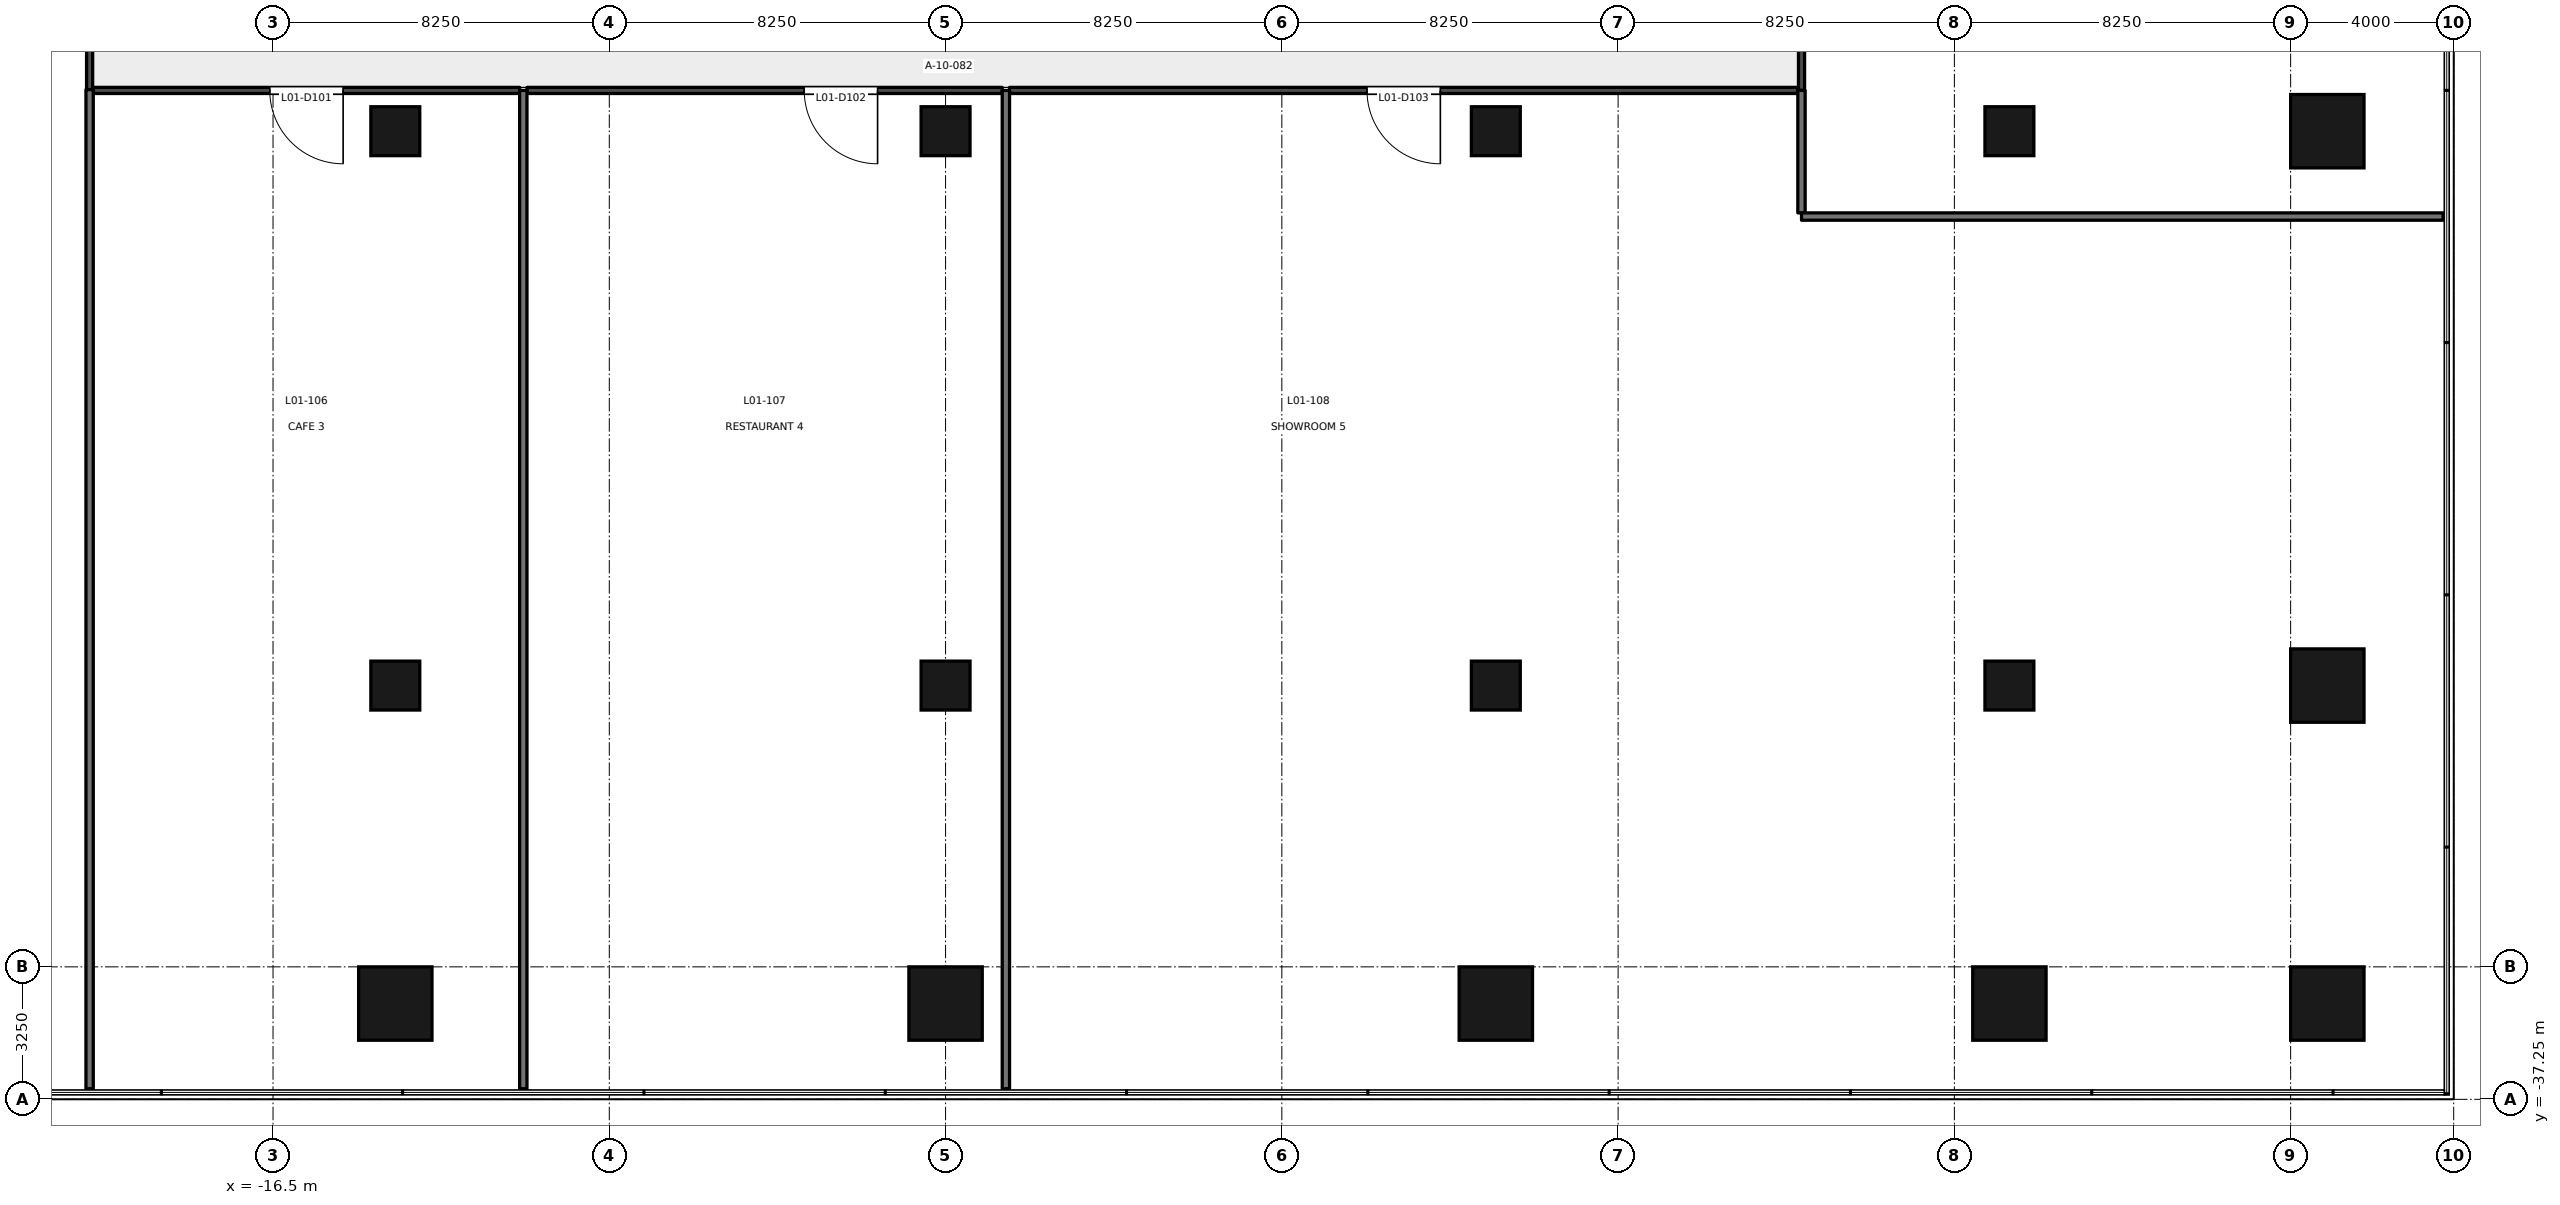
"""IFC4 building model, lengths in metres.
Left out: names, types, materials, properties, quantities, classifications, styles, units other than length and angle.
Written with IfcOpenShell. Run it as: python <this file> out.ifc"""

import sys

from ifc_helpers import new_model, si_unit, direction, frame, frame_2d, origin, origin_2d, place, context, subcontext, project, spatial, rectangle, extrude, element, fill, save


model = new_model("IFC4")
c1 = context("Model", 3, precision=1e-05, world=origin(), true_north=direction((0.0, 1.0)))
c2 = subcontext(c1, "Body", "Model", "MODEL_VIEW")
j1 = project(units=[si_unit("LENGTHUNIT", "METRE"), si_unit("PLANEANGLEUNIT", "RADIAN")], contexts=[c1])
p1 = place(None, origin())
s1 = spatial("IfcSite", under=j1, at=p1, CompositionType="ELEMENT")
p2 = place(p1, origin())
s2 = spatial("IfcBuilding", under=s1, at=p2, CompositionType="ELEMENT")
p3 = place(p2, frame((0.0, 0.0, 7.2)))
s3 = spatial("IfcBuildingStorey", under=s2, at=p3, CompositionType="ELEMENT", Elevation=7.2)
for number, where, z_axis, x_axis in (
    (1, (33.9, -34.9, -0.2), (0.0, 0.0, 1.0), (1.0, 0.0, 0.0)),
    (2, (-13.5, -34.9, -0.2), (0.0, 0.0, 1.0), (1.0, 0.0, 0.0)),
    (3, (0.0, -34.9, -0.2), (0.0, 0.0, 1.0), (1.0, 0.0, 0.0)),
    (4, (13.5, -34.9, -0.2), (0.0, 0.0, 1.0), (1.0, 0.0, 0.0)),
    (5, (26.1, -34.9, -0.2), (0.0, 0.0, 1.0), (1.0, 0.0, 0.0)),
    (6, (33.9, -27.1, -0.2), (0.0, 0.0, 1.0), (0.0, 1.0, 0.0)),
    (7, (33.9, -13.5, -0.2), (0.0, 0.0, 1.0), (0.0, 1.0, 0.0)),
):
    element("IfcColumn", number, at=place(p3, frame(where, z_axis=z_axis, x_axis=x_axis)), inside=s3, PredefinedType="COLUMN", context=c2, shape_type="SweptSolid", body=[
        extrude(rectangle(XDim=1.8, YDim=1.8, at=origin_2d()), origin(), (0.0, 0.0, 1.0), 5.4),
    ])
for number, where, z_axis, x_axis in (
    (8, (-13.5, -27.1, -0.2), (0.0, 0.0, 1.0), (1.0, 0.0, 0.0)),
    (9, (0.0, -27.1, -0.2), (0.0, 0.0, 1.0), (1.0, 0.0, 0.0)),
    (10, (13.5, -27.1, -0.2), (0.0, 0.0, 1.0), (1.0, 0.0, 0.0)),
    (11, (26.1, -27.1, -0.2), (0.0, 0.0, 1.0), (1.0, 0.0, 0.0)),
    (12, (-13.5, -13.5, -0.2), (0.0, 0.0, 1.0), (1.0, 0.0, 0.0)),
    (13, (0.0, -13.5, -0.2), (0.0, 0.0, 1.0), (1.0, 0.0, 0.0)),
    (14, (13.5, -13.5, -0.2), (0.0, 0.0, 1.0), (1.0, 0.0, 0.0)),
    (15, (26.1, -13.5, -0.2), (0.0, 0.0, 1.0), (1.0, 0.0, 0.0)),
):
    element("IfcColumn", number, at=place(p3, frame(where, z_axis=z_axis, x_axis=x_axis)), inside=s3, PredefinedType="COLUMN", context=c2, shape_type="SweptSolid", body=[
        extrude(rectangle(XDim=1.2, YDim=1.2, at=origin_2d()), origin(), (0.0, 0.0, 1.0), 5.4),
    ])
p4 = place(p3, frame((-21.0, -12.48, 0.0), z_axis=(0.0, 0.0, 1.0), x_axis=(0.0, 1.0, 0.0)))
e16 = element("IfcWall", 16, at=p4, inside=s3, PredefinedType="PARTITIONING", context=c2, shape_type="SweptSolid", body=[
    extrude(rectangle(XDim=5.08, YDim=0.15, at=frame_2d((2.54, 0.0))), origin(), (0.0, 0.0, 1.0), 5.2),
])
p5 = place(p4, frame((2.196, 0.0, 0.0)))
e17 = element("IfcOpeningElement", 17, at=p5, cuts=e16, PredefinedType="OPENING", context=c2, shape_type="SweptSolid", body=[
    extrude(rectangle(XDim=1.8, YDim=2.1, at=frame_2d((0.9, 1.05))), frame((0.0, 0.085, 0.0), z_axis=(0.0, -1.0, 0.0), x_axis=(1.0, 0.0, 0.0)), (0.0, 0.0, 1.0), 0.171),
])
p6 = place(p3, frame((-10.45, -12.5, 0.0), z_axis=(0.0, 0.0, 1.0), x_axis=(-1.0, 0.0, 0.0)))
e18 = element("IfcWall", 18, at=p6, inside=s3, PredefinedType="PARTITIONING", context=c2, shape_type="SweptSolid", body=[
    extrude(rectangle(XDim=10.46, YDim=0.15, at=frame_2d((5.23, 0.0))), origin(), (0.0, 0.0, 1.0), 3.8),
])
p7 = place(p6, frame((4.33, 0.0, 0.0)))
e19 = element("IfcOpeningElement", 19, at=p7, cuts=e18, PredefinedType="OPENING", context=c2, shape_type="SweptSolid", body=[
    extrude(rectangle(XDim=1.8, YDim=2.1, at=frame_2d((0.9, 1.05))), frame((0.0, 0.085, 0.0), z_axis=(0.0, -1.0, 0.0), x_axis=(1.0, 0.0, 0.0)), (0.0, 0.0, 1.0), 0.171),
])
p8 = place(p3, frame((1.39, -12.5, 0.0), z_axis=(0.0, 0.0, 1.0), x_axis=(-1.0, 0.0, 0.0)))
e20 = element("IfcWall", 20, at=p8, inside=s3, PredefinedType="PARTITIONING", context=c2, shape_type="SweptSolid", body=[
    extrude(rectangle(XDim=11.66, YDim=0.15, at=frame_2d((5.83, 0.0))), origin(), (0.0, 0.0, 1.0), 3.8),
])
p9 = place(p8, frame((3.058, 0.0, 0.0)))
e21 = element("IfcOpeningElement", 21, at=p9, cuts=e20, PredefinedType="OPENING", context=c2, shape_type="SweptSolid", body=[
    extrude(rectangle(XDim=1.8, YDim=2.1, at=frame_2d((0.9, 1.05))), frame((0.0, 0.085, 0.0), z_axis=(0.0, -1.0, 0.0), x_axis=(1.0, 0.0, 0.0)), (0.0, 0.0, 1.0), 0.171),
])
p10 = place(p3, frame((20.909, -12.5, 0.0), z_axis=(0.0, 0.0, 1.0), x_axis=(-1.0, 0.0, 0.0)))
e22 = element("IfcWall", 22, at=p10, inside=s3, PredefinedType="PARTITIONING", context=c2, shape_type="SweptSolid", body=[
    extrude(rectangle(XDim=19.339, YDim=0.15, at=frame_2d((9.669, 0.0))), origin(), (0.0, 0.0, 1.0), 3.8),
])
p11 = place(p10, frame((8.77, 0.0, 0.0)))
e23 = element("IfcOpeningElement", 23, at=p11, cuts=e22, PredefinedType="OPENING", context=c2, shape_type="SweptSolid", body=[
    extrude(rectangle(XDim=1.8, YDim=2.1, at=frame_2d((0.9, 1.05))), frame((0.0, 0.085, 0.0), z_axis=(0.0, -1.0, 0.0), x_axis=(1.0, 0.0, 0.0)), (0.0, 0.0, 1.0), 0.171),
])
p12 = place(p3, frame((21.0, -7.4, 0.0), z_axis=(0.0, 0.0, 1.0), x_axis=(0.0, -1.0, 0.0)))
e24 = element("IfcWall", 24, at=p12, inside=s3, PredefinedType="PARTITIONING", context=c2, shape_type="SweptSolid", body=[
    extrude(rectangle(XDim=5.1, YDim=0.15, at=frame_2d((2.55, 0.0))), origin(), (0.0, 0.0, 1.0), 5.2),
])
p13 = place(p12, frame((1.09, 0.0, 0.0)))
e25 = element("IfcOpeningElement", 25, at=p13, cuts=e24, PredefinedType="OPENING", context=c2, shape_type="SweptSolid", body=[
    extrude(rectangle(XDim=1.8, YDim=2.1, at=frame_2d((0.9, 1.05))), frame((0.0, 0.085, 0.0), z_axis=(0.0, -1.0, 0.0), x_axis=(1.0, 0.0, 0.0)), (0.0, 0.0, 1.0), 0.171),
])
p14 = place(p3, frame((-21.0, -12.48, 0.0), z_axis=(0.0, 0.0, 1.0), x_axis=(0.0, -1.0, 0.0)))
e26 = element("IfcWall", 26, at=p14, inside=s3, PredefinedType="PARTITIONING", context=c2, shape_type="SweptSolid", body=[
    extrude(rectangle(XDim=24.51, YDim=0.18, at=frame_2d((12.255, 0.0))), origin(), (0.0, 0.0, 1.0), 4.2),
])
for number, where, z_axis, x_axis in (
    (27, (-10.36, -12.5, 0.0), (0.0, 0.0, 1.0), (0.0, -1.0, 0.0)),
    (28, (1.48, -12.5, 0.0), (0.0, 0.0, 1.0), (0.0, -1.0, 0.0)),
):
    element("IfcWall", number, at=place(p3, frame(where, z_axis=z_axis, x_axis=x_axis)), inside=s3, PredefinedType="PARTITIONING", context=c2, shape_type="SweptSolid", body=[
        extrude(rectangle(XDim=24.49, YDim=0.18, at=frame_2d((12.245, 0.0))), origin(), (0.0, 0.0, 1.0), 4.2),
    ])
p15 = place(p3, frame((20.999, -12.5, 0.0), z_axis=(0.0, 0.0, 1.0), x_axis=(0.0, -1.0, 0.0)))
e29 = element("IfcWall", 29, at=p15, inside=s3, PredefinedType="PARTITIONING", context=c2, shape_type="SweptSolid", body=[
    extrude(rectangle(XDim=3.004, YDim=0.18, at=frame_2d((1.502, 0.0))), origin(), (0.0, 0.0, 1.0), 4.2),
])
p16 = place(p3, frame((21.0, -15.594, 0.0), z_axis=(0.0, 0.0, 1.0), x_axis=(1.0, 0.0, 0.0)))
e30 = element("IfcWall", 30, at=p16, inside=s3, PredefinedType="PARTITIONING", context=c2, shape_type="SweptSolid", body=[
    extrude(rectangle(XDim=15.74, YDim=0.18, at=frame_2d((7.87, 0.0))), origin(), (0.0, 0.0, 1.0), 4.2),
])
p17 = place(p7, origin())
e31 = element("IfcDoor", 31, at=p17, inside=s3, OperationType="DOUBLE_DOOR_SINGLE_SWING", PredefinedType="DOOR", context=c2, shape_type="SweptSolid", body=[
    extrude(rectangle(XDim=1.8, YDim=2.1, at=frame_2d((0.9, 1.05))), frame((0.0, 0.025, 0.0), z_axis=(0.0, -1.0, 0.0), x_axis=(1.0, 0.0, 0.0)), (0.0, 0.0, 1.0), 0.05),
])
fill(e19, e31)
p18 = place(p9, origin())
e32 = element("IfcDoor", 32, at=p18, inside=s3, OperationType="DOUBLE_DOOR_SINGLE_SWING", PredefinedType="DOOR", context=c2, shape_type="SweptSolid", body=[
    extrude(rectangle(XDim=1.8, YDim=2.1, at=frame_2d((0.9, 1.05))), frame((0.0, 0.025, 0.0), z_axis=(0.0, -1.0, 0.0), x_axis=(1.0, 0.0, 0.0)), (0.0, 0.0, 1.0), 0.05),
])
fill(e21, e32)
p19 = place(p11, origin())
e33 = element("IfcDoor", 33, at=p19, inside=s3, OperationType="DOUBLE_DOOR_SINGLE_SWING", PredefinedType="DOOR", context=c2, shape_type="SweptSolid", body=[
    extrude(rectangle(XDim=1.8, YDim=2.1, at=frame_2d((0.9, 1.05))), frame((0.0, 0.025, 0.0), z_axis=(0.0, -1.0, 0.0), x_axis=(1.0, 0.0, 0.0)), (0.0, 0.0, 1.0), 0.05),
])
fill(e23, e33)
save(model, sys.argv[1])
